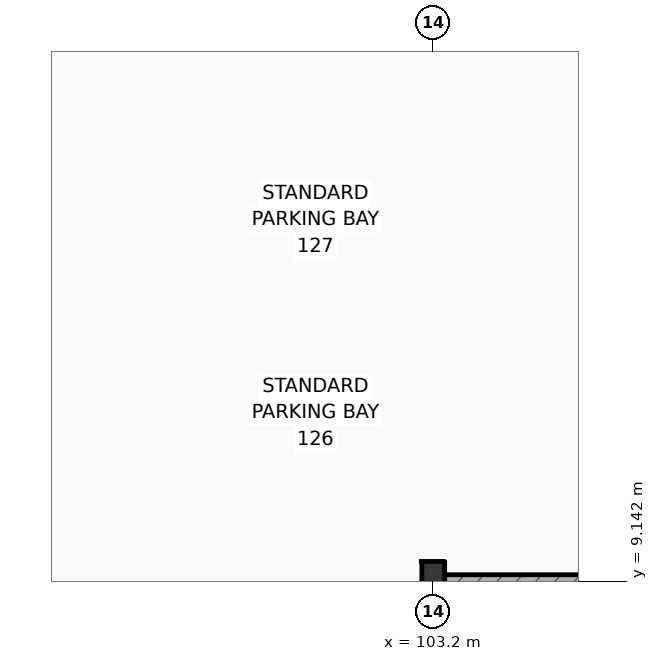
"""IFC4 building model, lengths in metres.
Left out: names, types, materials, properties, quantities, classifications, styles, units other than length and angle.
Written with IfcOpenShell. Run it as: python <this file> out.ifc"""

import sys

from ifc_helpers import new_model, si_unit, direction, frame, frame_2d, origin, origin_2d, place, context, subcontext, project, spatial, rectangle, i_section, extrude, element, save


model = new_model("IFC4")
c1 = context("Model", 3, precision=1e-05, world=origin(), true_north=direction((0.0, 1.0)))
c2 = subcontext(c1, "Body", "Model", "MODEL_VIEW")
j1 = project(units=[si_unit("LENGTHUNIT", "METRE"), si_unit("PLANEANGLEUNIT", "RADIAN")], contexts=[c1])
p1 = place(None, origin())
s1 = spatial("IfcSite", under=j1, at=p1, CompositionType="ELEMENT")
p2 = place(p1, origin())
s2 = spatial("IfcBuilding", under=s1, at=p2, CompositionType="ELEMENT")
p3 = place(p2, frame((0.0, 0.0, -4.5)))
s3 = spatial("IfcBuildingStorey", under=s2, at=p3, CompositionType="ELEMENT", Elevation=-4.5)
p4 = place(p3, frame((103.2, 9.0, 0.0), z_axis=(0.0, 0.0, 1.0), x_axis=(1.0, 0.0, 0.0)))
e1 = element("IfcWall", 1, at=p4, inside=s3, PredefinedType="SOLIDWALL", context=c2, shape_type="SweptSolid", body=[
    extrude(rectangle(XDim=68.8, YDim=0.45, at=frame_2d((34.4, 0.0))), origin(), (0.0, 0.0, 1.0), 4.5),
])
p5 = place(p3, frame((103.2, 9.0, 0.0), z_axis=(0.0, 0.0, 1.0), x_axis=(1.0, 0.0, 0.0)))
e2 = element("IfcColumn", 2, at=p5, inside=s3, PredefinedType="COLUMN", context=c2, shape_type="SweptSolid", body=[
    extrude(i_section(OverallWidth=0.3, OverallDepth=0.8, WebThickness=0.018, FlangeThickness=0.033, FilletRadius=0.03, at=origin_2d()), origin(), (0.0, 0.0, 1.0), 4.5),
])
save(model, sys.argv[1])
